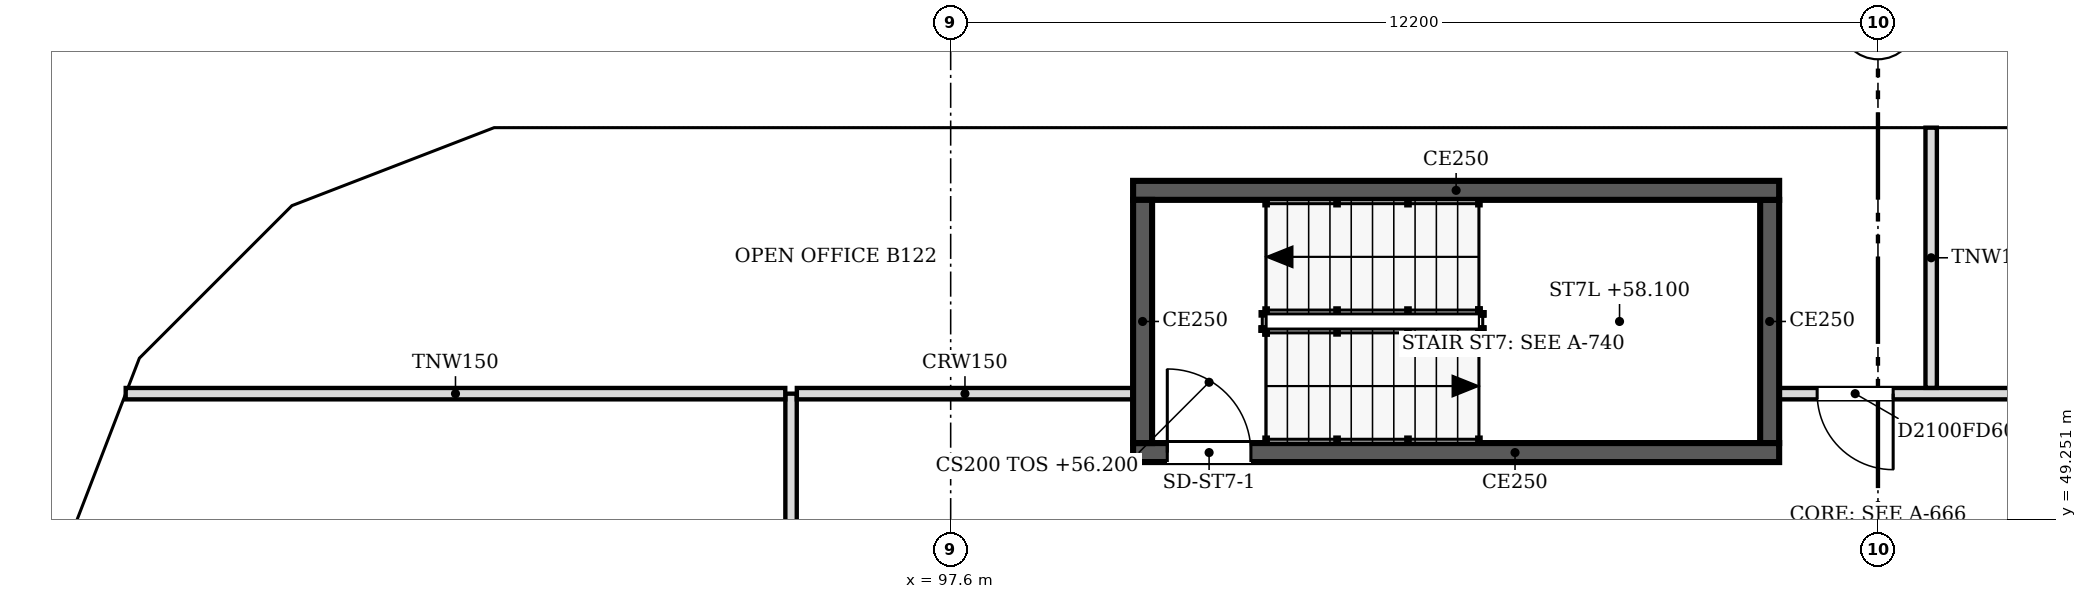
"""IFC4 building model, lengths in metres.
Left out: names, types, materials, properties, quantities, classifications, styles, units other than length and angle.
Written with IfcOpenShell. Run it as: python <this file> out.ifc"""

import sys

from ifc_helpers import new_model, si_unit, direction, frame, frame_2d, origin, place, context, subcontext, project, spatial, polyline, rectangle, outline, extrude, faceted_brep, source, transform, mapped, element, fill, save


model = new_model("IFC4")
c1 = context("Model", 3, precision=1e-05, world=origin(), true_north=direction((0.0, 1.0)))
c2 = subcontext(c1, "Body", "Model", "MODEL_VIEW")
j1 = project(units=[si_unit("LENGTHUNIT", "METRE"), si_unit("PLANEANGLEUNIT", "RADIAN")], contexts=[c1])
p1 = place(None, origin())
s1 = spatial("IfcSite", under=j1, at=p1, CompositionType="ELEMENT")
p2 = place(p1, origin())
s2 = spatial("IfcBuilding", under=s1, at=p2, CompositionType="ELEMENT")
p3 = place(p2, frame((0.0, 0.0, 56.2)))
s3 = spatial("IfcBuildingStorey", under=s2, at=p3, CompositionType="ELEMENT", Elevation=56.2)
m1 = source(origin(), c2, "Body", "SweptSolid", [
    extrude(outline(polyline([(3.05, 0.0), (6.1, 3.8), (3.05, 7.6), (0.0, 3.8), (3.05, 0.0)])), frame((0.0, 0.25, 0.0), z_axis=(0.0, -1.0, 0.0), x_axis=(1.0, 0.0, 0.0)), (0.0, 0.0, 1.0), 0.5),
])
p4 = place(p3, frame((112.85, 54.65, -3.8), z_axis=(0.0, 0.0, 1.0), x_axis=(-1.0, 0.0, 0.0)))
e1 = element("IfcWall", 1, at=p4, inside=s3, PredefinedType="SOLIDWALL", context=c2, shape_type="MappedRepresentation", body=[
    mapped(m1, transform((0.0, 0.0, 0.0), scale=1.0)),
])
m2 = source(origin(), c2, "Body", "SweptSolid", [
    extrude(outline(polyline([(3.05, 0.399), (5.78, 3.8), (3.05, 7.201), (0.321, 3.8), (3.05, 0.399)])), frame((0.0, 0.26, 0.0), z_axis=(0.0, -1.0, 0.0), x_axis=(1.0, 0.0, 0.0)), (0.0, 0.0, 1.0), 0.52),
])
p5 = place(p4, origin())
e2 = element("IfcOpeningElement", 2, at=p5, cuts=e1, PredefinedType="OPENING", context=c2, shape_type="MappedRepresentation", body=[
    mapped(m2, transform((0.0, 0.0, 0.0), scale=1.0)),
])
p6 = place(p3, frame((106.75, 54.65, -3.8), z_axis=(0.0, 0.0, 1.0), x_axis=(-1.0, 0.0, 0.0)))
e3 = element("IfcWall", 3, at=p6, inside=s3, PredefinedType="SOLIDWALL", context=c2, shape_type="MappedRepresentation", body=[
    mapped(m1, transform((0.0, 0.0, 0.0), scale=1.0)),
])
p7 = place(p6, origin())
e4 = element("IfcOpeningElement", 4, at=p7, cuts=e3, PredefinedType="OPENING", context=c2, shape_type="MappedRepresentation", body=[
    mapped(m2, transform((0.0, 0.0, 0.0), scale=1.0)),
])
m3 = source(origin(), c2, "Body", "Brep", [
    faceted_brep([(3.05, -0.25, 0.0), (6.1, -0.25, 3.8), (6.1, -0.25, 3.8), (3.05, -0.25, 7.6), (0.0, -0.25, 3.8), (0.0, 0.25, 3.8), (3.05, 0.25, 7.6), (6.1, 0.25, 3.8), (6.1, 0.25, 3.8), (3.05, 0.25, 0.0)], [[[0, 1, 2, 3, 4]], [[5, 6, 7, 8, 9]], [[9, 8, 1, 0]], [[7, 6, 3, 2]], [[6, 5, 4, 3]], [[5, 9, 0, 4]], [[1, 8, 7, 2]]]),
])
p8 = place(p3, frame((100.65, 54.65, -3.8), z_axis=(0.0, 0.0, 1.0), x_axis=(-1.0, 0.0, 0.0)))
e5 = element("IfcWall", 5, at=p8, inside=s3, PredefinedType="SOLIDWALL", context=c2, shape_type="MappedRepresentation", body=[
    mapped(m3, transform((0.0, 0.0, 0.0), scale=1.0)),
])
p9 = place(p8, origin())
e6 = element("IfcOpeningElement", 6, at=p9, cuts=e5, PredefinedType="OPENING", context=c2, shape_type="MappedRepresentation", body=[
    mapped(m2, transform((0.0, 0.0, 0.0), scale=1.0)),
])
m4 = source(origin(), c2, "Body", "Brep", [
    faceted_brep([(3.003, -0.25, 0.0), (3.05, -0.25, 0.06), (3.05, -0.25, 7.54), (3.003, -0.25, 7.6), (0.0, -0.25, 3.8), (0.0, 0.25, 3.8), (2.957, 0.25, 7.541), (2.957, 0.25, 0.059), (3.003, 0.0, 0.0), (3.003, 0.0, 7.6)], [[[0, 1, 2, 3, 4]], [[5, 6, 7]], [[1, 0, 8]], [[9, 3, 2]], [[6, 5, 4, 3, 9]], [[5, 7, 8, 0, 4]], [[1, 8, 7, 6, 9, 2]]]),
])
p10 = place(p3, frame((94.55, 54.65, -3.8), z_axis=(0.0, 0.0, 1.0), x_axis=(-1.0, 0.0, 0.0)))
e7 = element("IfcWall", 7, at=p10, inside=s3, PredefinedType="SOLIDWALL", context=c2, shape_type="MappedRepresentation", body=[
    mapped(m4, transform((0.0, 0.0, 0.0), scale=1.0)),
])
m5 = source(origin(), c2, "Body", "SweptSolid", [
    extrude(outline(polyline([(2.803, 6.944), (0.319, 3.8), (2.803, 0.656), (2.803, 6.944)])), frame((0.0, 0.26, 0.0), z_axis=(0.0, -1.0, 0.0), x_axis=(1.0, 0.0, 0.0)), (0.0, 0.0, 1.0), 0.52),
])
p11 = place(p10, origin())
e8 = element("IfcOpeningElement", 8, at=p11, cuts=e7, PredefinedType="OPENING", context=c2, shape_type="MappedRepresentation", body=[
    mapped(m5, transform((0.0, 0.0, 0.0), scale=1.0)),
])
m6 = source(origin(), c2, "Body", "Brep", [
    faceted_brep([(0.047, -0.25, 0.0), (2.997, -0.25, 3.8), (0.047, -0.25, 7.6), (0.0, -0.25, 7.541), (0.0, -0.25, 0.059), (0.093, 0.25, 7.54), (2.944, 0.25, 3.868), (2.944, 0.25, 3.732), (0.093, 0.25, 0.06), (2.997, 0.0, 3.8), (0.047, 0.0, 0.0), (0.047, 0.0, 7.6)], [[[0, 1, 2, 3, 4]], [[5, 6, 7, 8]], [[8, 7, 9, 1, 0, 10]], [[6, 5, 11, 2, 1, 9]], [[3, 2, 11]], [[10, 0, 4]], [[8, 10, 4, 3, 11, 5]], [[9, 7, 6]]]),
])
p12 = place(p3, frame((91.59, 54.667, -3.8), z_axis=(0.0, 0.0, 1.0), x_axis=(-0.933000876937, -0.359874094142, 0.0)))
e9 = element("IfcWall", 9, at=p12, inside=s3, PredefinedType="SOLIDWALL", context=c2, shape_type="MappedRepresentation", body=[
    mapped(m6, transform((0.0, 0.0, 0.0), scale=1.0)),
])
m7 = source(origin(), c2, "Body", "SweptSolid", [
    extrude(outline(polyline([(0.247, 0.665), (2.681, 3.8), (0.247, 6.935), (0.247, 0.665)])), frame((0.0, 0.26, 0.0), z_axis=(0.0, -1.0, 0.0), x_axis=(1.0, 0.0, 0.0)), (0.0, 0.0, 1.0), 0.52),
])
p13 = place(p12, origin())
e10 = element("IfcOpeningElement", 10, at=p13, cuts=e9, PredefinedType="OPENING", context=c2, shape_type="MappedRepresentation", body=[
    mapped(m7, transform((0.0, 0.0, 0.0), scale=1.0)),
])
m8 = source(origin(), c2, "Body", "Brep", [
    faceted_brep([(2.944, -0.25, 0.0), (2.997, -0.25, 0.068), (2.997, -0.25, 7.532), (2.944, -0.25, 7.6), (0.0, -0.25, 3.8), (0.053, 0.25, 3.868), (2.891, 0.25, 7.532), (2.891, 0.25, 0.068), (0.053, 0.25, 3.732), (2.944, 0.0, 0.0), (2.944, 0.0, 7.6), (0.0, 0.0, 3.8)], [[[0, 1, 2, 3, 4]], [[5, 6, 7, 8]], [[1, 0, 9]], [[10, 3, 2]], [[6, 5, 11, 4, 3, 10]], [[8, 7, 9, 0, 4, 11]], [[8, 11, 5]], [[1, 9, 7, 6, 10, 2]]]),
])
p14 = place(p3, frame((88.794, 53.588, -3.8), z_axis=(0.0, 0.0, 1.0), x_axis=(-0.707066050402, -0.707147509625, 0.0)))
e11 = element("IfcWall", 11, at=p14, inside=s3, PredefinedType="SOLIDWALL", context=c2, shape_type="MappedRepresentation", body=[
    mapped(m8, transform((0.0, 0.0, 0.0), scale=1.0)),
])
m9 = source(origin(), c2, "Body", "SweptSolid", [
    extrude(outline(polyline([(2.744, 6.934), (0.316, 3.8), (2.744, 0.667), (2.744, 6.934)])), frame((0.0, 0.26, 0.0), z_axis=(0.0, -1.0, 0.0), x_axis=(1.0, 0.0, 0.0)), (0.0, 0.0, 1.0), 0.52),
])
p15 = place(p14, origin())
e12 = element("IfcOpeningElement", 12, at=p15, cuts=e11, PredefinedType="OPENING", context=c2, shape_type="MappedRepresentation", body=[
    mapped(m9, transform((0.0, 0.0, 0.0), scale=1.0)),
])
m10 = source(origin(), c2, "Body", "Brep", [
    faceted_brep([(0.053, -0.25, 0.0), (3.003, -0.25, 3.8), (0.053, -0.25, 7.6), (0.0, -0.25, 7.532), (0.0, -0.25, 0.068), (0.106, 0.25, 7.532), (2.957, 0.25, 3.86), (2.957, 0.25, 3.74), (0.106, 0.25, 0.068), (3.003, 0.0, 3.8), (0.053, 0.0, 0.0), (0.053, 0.0, 7.6)], [[[0, 1, 2, 3, 4]], [[5, 6, 7, 8]], [[8, 7, 9, 1, 0, 10]], [[6, 5, 11, 2, 1, 9]], [[3, 2, 11]], [[10, 0, 4]], [[8, 10, 4, 3, 11, 5]], [[9, 7, 6]]]),
])
p16 = place(p3, frame((86.731, 51.556, -3.8), z_axis=(0.0, 0.0, 1.0), x_axis=(-0.359855894603, -0.933007896601, 0.0)))
e13 = element("IfcWall", 13, at=p16, inside=s3, PredefinedType="SOLIDWALL", context=c2, shape_type="MappedRepresentation", body=[
    mapped(m10, transform((0.0, 0.0, 0.0), scale=1.0)),
])
m11 = source(origin(), c2, "Body", "SweptSolid", [
    extrude(outline(polyline([(0.253, 0.665), (2.687, 3.8), (0.253, 6.935), (0.253, 0.665)])), frame((0.0, 0.26, 0.0), z_axis=(0.0, -1.0, 0.0), x_axis=(1.0, 0.0, 0.0)), (0.0, 0.0, 1.0), 0.52),
])
p17 = place(p16, origin())
e14 = element("IfcOpeningElement", 14, at=p17, cuts=e13, PredefinedType="OPENING", context=c2, shape_type="MappedRepresentation", body=[
    mapped(m11, transform((0.0, 0.0, 0.0), scale=1.0)),
])
p18 = place(p2, frame((0.0, 0.0, 60.0)))
s4 = spatial("IfcBuildingStorey", under=s2, at=p18, CompositionType="ELEMENT", Elevation=60.0)
p19 = place(p18, frame((115.9, 54.65, -3.8), z_axis=(0.0, 0.0, 1.0), x_axis=(-1.0, 0.0, 0.0)))
e15 = element("IfcWall", 15, at=p19, inside=s4, PredefinedType="SOLIDWALL", context=c2, shape_type="MappedRepresentation", body=[
    mapped(m3, transform((0.0, 0.0, 0.0), scale=1.0)),
])
p20 = place(p19, origin())
e16 = element("IfcOpeningElement", 16, at=p20, cuts=e15, PredefinedType="OPENING", context=c2, shape_type="MappedRepresentation", body=[
    mapped(m2, transform((0.0, 0.0, 0.0), scale=1.0)),
])
p21 = place(p18, frame((109.8, 54.65, -3.8), z_axis=(0.0, 0.0, 1.0), x_axis=(-1.0, 0.0, 0.0)))
e17 = element("IfcWall", 17, at=p21, inside=s4, PredefinedType="SOLIDWALL", context=c2, shape_type="MappedRepresentation", body=[
    mapped(m1, transform((0.0, 0.0, 0.0), scale=1.0)),
])
p22 = place(p21, origin())
e18 = element("IfcOpeningElement", 18, at=p22, cuts=e17, PredefinedType="OPENING", context=c2, shape_type="MappedRepresentation", body=[
    mapped(m2, transform((0.0, 0.0, 0.0), scale=1.0)),
])
p23 = place(p18, frame((103.7, 54.65, -3.8), z_axis=(0.0, 0.0, 1.0), x_axis=(-1.0, 0.0, 0.0)))
e19 = element("IfcWall", 19, at=p23, inside=s4, PredefinedType="SOLIDWALL", context=c2, shape_type="MappedRepresentation", body=[
    mapped(m3, transform((0.0, 0.0, 0.0), scale=1.0)),
])
p24 = place(p23, origin())
e20 = element("IfcOpeningElement", 20, at=p24, cuts=e19, PredefinedType="OPENING", context=c2, shape_type="MappedRepresentation", body=[
    mapped(m2, transform((0.0, 0.0, 0.0), scale=1.0)),
])
m12 = source(origin(), c2, "Body", "Brep", [
    faceted_brep([(3.05, -0.25, 0.0), (6.053, -0.25, 3.8), (3.05, -0.25, 7.6), (0.0, -0.25, 3.8), (0.0, 0.25, 3.8), (3.05, 0.25, 7.6), (6.007, 0.25, 3.859), (6.007, 0.25, 3.741), (3.05, 0.25, 0.0), (6.053, 0.0, 3.8)], [[[0, 1, 2, 3]], [[4, 5, 6, 7, 8]], [[8, 7, 9, 1, 0]], [[6, 5, 2, 1, 9]], [[5, 4, 3, 2]], [[4, 8, 0, 3]], [[9, 7, 6]]]),
])
p25 = place(p18, frame((97.6, 54.65, -3.8), z_axis=(0.0, 0.0, 1.0), x_axis=(-1.0, 0.0, 0.0)))
e21 = element("IfcWall", 21, at=p25, inside=s4, PredefinedType="SOLIDWALL", context=c2, shape_type="MappedRepresentation", body=[
    mapped(m12, transform((0.0, 0.0, 0.0), scale=1.0)),
])
m13 = source(origin(), c2, "Body", "SweptSolid", [
    extrude(outline(polyline([(3.049, 0.401), (5.735, 3.8), (3.049, 7.199), (0.321, 3.8), (3.049, 0.401)])), frame((0.0, 0.26, 0.0), z_axis=(0.0, -1.0, 0.0), x_axis=(1.0, 0.0, 0.0)), (0.0, 0.0, 1.0), 0.52),
])
p26 = place(p25, origin())
e22 = element("IfcOpeningElement", 22, at=p26, cuts=e21, PredefinedType="OPENING", context=c2, shape_type="MappedRepresentation", body=[
    mapped(m13, transform((0.0, 0.0, 0.0), scale=1.0)),
])
m14 = source(origin(), c2, "Body", "Brep", [
    faceted_brep([(2.95, -0.25, 0.0), (3.003, -0.25, 0.068), (3.003, -0.25, 7.532), (2.95, -0.25, 7.6), (0.0, -0.25, 3.8), (0.047, 0.25, 3.86), (2.898, 0.25, 7.532), (2.898, 0.25, 0.068), (0.047, 0.25, 3.74), (2.95, 0.0, 0.0), (2.95, 0.0, 7.6), (0.0, 0.0, 3.8)], [[[0, 1, 2, 3, 4]], [[5, 6, 7, 8]], [[1, 0, 9]], [[10, 3, 2]], [[6, 5, 11, 4, 3, 10]], [[8, 7, 9, 0, 4, 11]], [[8, 11, 5]], [[1, 9, 7, 6, 10, 2]]]),
])
p27 = place(p18, frame((91.547, 54.65, -3.8), z_axis=(0.0, 0.0, 1.0), x_axis=(-0.933007896601, -0.359855894603, 0.0)))
e23 = element("IfcWall", 23, at=p27, inside=s4, PredefinedType="SOLIDWALL", context=c2, shape_type="MappedRepresentation", body=[
    mapped(m14, transform((0.0, 0.0, 0.0), scale=1.0)),
])
m15 = source(origin(), c2, "Body", "SweptSolid", [
    extrude(outline(polyline([(2.75, 6.935), (0.316, 3.8), (2.75, 0.665), (2.75, 6.935)])), frame((0.0, 0.26, 0.0), z_axis=(0.0, -1.0, 0.0), x_axis=(1.0, 0.0, 0.0)), (0.0, 0.0, 1.0), 0.52),
])
p28 = place(p27, origin())
e24 = element("IfcOpeningElement", 24, at=p28, cuts=e23, PredefinedType="OPENING", context=c2, shape_type="MappedRepresentation", body=[
    mapped(m15, transform((0.0, 0.0, 0.0), scale=1.0)),
])
m16 = source(origin(), c2, "Body", "Brep", [
    faceted_brep([(0.053, -0.25, 0.0), (2.997, -0.25, 3.8), (0.053, -0.25, 7.6), (0.0, -0.25, 7.532), (0.0, -0.25, 0.068), (0.106, 0.25, 7.532), (2.944, 0.25, 3.868), (2.944, 0.25, 3.732), (0.106, 0.25, 0.068), (2.997, 0.0, 3.8), (0.053, 0.0, 0.0), (0.053, 0.0, 7.6)], [[[0, 1, 2, 3, 4]], [[5, 6, 7, 8]], [[8, 7, 9, 1, 0, 10]], [[6, 5, 11, 2, 1, 9]], [[3, 2, 11]], [[10, 0, 4]], [[8, 10, 4, 3, 11, 5]], [[9, 7, 6]]]),
])
p29 = place(p18, frame((88.831, 53.625, -3.8), z_axis=(0.0, 0.0, 1.0), x_axis=(-0.707147509625, -0.707066050402, 0.0)))
e25 = element("IfcWall", 25, at=p29, inside=s4, PredefinedType="SOLIDWALL", context=c2, shape_type="MappedRepresentation", body=[
    mapped(m16, transform((0.0, 0.0, 0.0), scale=1.0)),
])
m17 = source(origin(), c2, "Body", "SweptSolid", [
    extrude(outline(polyline([(0.253, 0.666), (2.681, 3.8), (0.253, 6.934), (0.253, 0.666)])), frame((0.0, 0.26, 0.0), z_axis=(0.0, -1.0, 0.0), x_axis=(1.0, 0.0, 0.0)), (0.0, 0.0, 1.0), 0.52),
])
p30 = place(p29, origin())
e26 = element("IfcOpeningElement", 26, at=p30, cuts=e25, PredefinedType="OPENING", context=c2, shape_type="MappedRepresentation", body=[
    mapped(m17, transform((0.0, 0.0, 0.0), scale=1.0)),
])
m18 = source(origin(), c2, "Body", "Brep", [
    faceted_brep([(2.95, -0.25, 0.0), (2.997, -0.25, 0.059), (2.997, -0.25, 7.541), (2.95, -0.25, 7.6), (0.0, -0.25, 3.8), (0.053, 0.25, 3.868), (2.904, 0.25, 7.54), (2.904, 0.25, 0.06), (0.053, 0.25, 3.732), (2.95, 0.0, 0.0), (2.95, 0.0, 7.6), (0.0, 0.0, 3.8)], [[[0, 1, 2, 3, 4]], [[5, 6, 7, 8]], [[1, 0, 9]], [[10, 3, 2]], [[6, 5, 11, 4, 3, 10]], [[8, 7, 9, 0, 4, 11]], [[8, 11, 5]], [[1, 9, 7, 6, 10, 2]]]),
])
p31 = place(p18, frame((86.712, 51.506, -3.8), z_axis=(0.0, 0.0, 1.0), x_axis=(-0.359874094142, -0.933000876937, 0.0)))
e27 = element("IfcWall", 27, at=p31, inside=s4, PredefinedType="SOLIDWALL", context=c2, shape_type="MappedRepresentation", body=[
    mapped(m18, transform((0.0, 0.0, 0.0), scale=1.0)),
])
p32 = place(p31, origin())
e28 = element("IfcOpeningElement", 28, at=p32, cuts=e27, PredefinedType="OPENING", context=c2, shape_type="MappedRepresentation", body=[
    mapped(m15, transform((0.0, 0.0, 0.0), scale=1.0)),
])
p33 = place(p3, frame((108.5, 50.125, 0.0), z_axis=(0.0, 0.0, 1.0), x_axis=(-1.0, 0.0, 0.0)))
e29 = element("IfcWall", 29, at=p33, inside=s3, PredefinedType="SOLIDWALL", context=c2, shape_type="SweptSolid", body=[
    extrude(rectangle(XDim=8.5, YDim=0.25, at=frame_2d((4.25, 0.0))), origin(), (0.0, 0.0, 1.0), 3.8),
])
m19 = source(origin(), c2, "Body", "SweptSolid", [
    extrude(rectangle(XDim=1.1, YDim=2.1, at=frame_2d((0.55, 1.05))), frame((0.0, 0.135, 0.0), z_axis=(0.0, -1.0, 0.0), x_axis=(1.0, 0.0, 0.0)), (0.0, 0.0, 1.0), 0.27),
])
p34 = place(p33, frame((6.95, 0.0, 0.0)))
e30 = element("IfcOpeningElement", 30, at=p34, cuts=e29, PredefinedType="OPENING", context=c2, shape_type="MappedRepresentation", body=[
    mapped(m19, transform((0.0, 0.0, 0.0), scale=1.0)),
])
p35 = place(p3, frame((100.125, 50.25, 0.0), z_axis=(0.0, 0.0, 1.0), x_axis=(0.0, 1.0, 0.0)))
e31 = element("IfcWall", 31, at=p35, inside=s3, PredefinedType="SOLIDWALL", context=c2, shape_type="SweptSolid", body=[
    extrude(rectangle(XDim=3.2, YDim=0.25, at=frame_2d((1.6, 0.0))), origin(), (0.0, 0.0, 1.0), 3.8),
])
p36 = place(p3, frame((100.0, 53.575, 0.0), z_axis=(0.0, 0.0, 1.0), x_axis=(1.0, 0.0, 0.0)))
e32 = element("IfcWall", 32, at=p36, inside=s3, PredefinedType="SOLIDWALL", context=c2, shape_type="SweptSolid", body=[
    extrude(rectangle(XDim=8.5, YDim=0.25, at=frame_2d((4.25, 0.0))), origin(), (0.0, 0.0, 1.0), 3.8),
])
p37 = place(p3, frame((108.375, 53.45, 0.0), z_axis=(0.0, 0.0, 1.0), x_axis=(0.0, -1.0, 0.0)))
e33 = element("IfcWall", 33, at=p37, inside=s3, PredefinedType="SOLIDWALL", context=c2, shape_type="SweptSolid", body=[
    extrude(rectangle(XDim=3.2, YDim=0.25, at=frame_2d((1.6, 0.0))), origin(), (0.0, 0.0, 1.0), 3.8),
])
p38 = place(p3, frame((95.5, 36.676, 0.0), z_axis=(0.0, 0.0, 1.0), x_axis=(0.0, 1.0, 0.0)))
e34 = element("IfcWall", 34, at=p38, inside=s3, PredefinedType="PARTITIONING", context=c2, shape_type="SweptSolid", body=[
    extrude(rectangle(XDim=14.224, YDim=0.15, at=frame_2d((7.112, 0.0))), origin(), (0.0, 0.0, 1.0), 3.067),
])
m20 = source(origin(), c2, "Body", "SweptSolid", [
    extrude(rectangle(XDim=1.0, YDim=2.1, at=frame_2d((0.5, 1.05))), frame((0.0, 0.085, 0.0), z_axis=(0.0, -1.0, 0.0), x_axis=(1.0, 0.0, 0.0)), (0.0, 0.0, 1.0), 0.17),
])
p39 = place(p38, frame((11.025, 0.0, 0.0)))
e35 = element("IfcOpeningElement", 35, at=p39, cuts=e34, PredefinedType="OPENING", context=c2, shape_type="MappedRepresentation", body=[
    mapped(m20, transform((0.0, 0.0, 0.0), scale=1.0)),
])
p40 = place(p3, frame((86.746, 50.9, 0.0), z_axis=(0.0, 0.0, 1.0), x_axis=(1.0, 0.0, 0.0)))
e36 = element("IfcWall", 36, at=p40, inside=s3, PredefinedType="PARTITIONING", context=c2, shape_type="SweptSolid", body=[
    extrude(rectangle(XDim=8.678, YDim=0.15, at=frame_2d((4.339, 0.0))), origin(), (0.0, 0.0, 1.0), 3.067),
])
p41 = place(p3, frame((95.576, 50.9, 0.0), z_axis=(0.0, 0.0, 1.0), x_axis=(1.0, 0.0, 0.0)))
e37 = element("IfcWall", 37, at=p41, inside=s3, PredefinedType="PARTITIONING", context=c2, shape_type="SweptSolid", body=[
    extrude(rectangle(XDim=4.424, YDim=0.15, at=frame_2d((2.212, 0.0))), origin(), (0.0, 0.0, 1.0), 3.067),
])
p42 = place(p3, frame((108.5, 50.9, 0.0), z_axis=(0.0, 0.0, 1.0), x_axis=(1.0, 0.0, 0.0)))
e38 = element("IfcWall", 38, at=p42, inside=s3, PredefinedType="PARTITIONING", context=c2, shape_type="SweptSolid", body=[
    extrude(rectangle(XDim=15.6, YDim=0.15, at=frame_2d((7.8, 0.0))), origin(), (0.0, 0.0, 1.0), 3.067),
])
p43 = place(p42, frame((0.5, 0.0, 0.0)))
e39 = element("IfcOpeningElement", 39, at=p43, cuts=e38, PredefinedType="OPENING", context=c2, shape_type="MappedRepresentation", body=[
    mapped(m20, transform((0.0, 0.0, 0.0), scale=1.0)),
])
m21 = source(origin(), c2, "Body", "SweptSolid", [
    extrude(rectangle(XDim=0.9, YDim=2.1, at=frame_2d((0.45, 1.05))), frame((0.0, 0.085, 0.0), z_axis=(0.0, -1.0, 0.0), x_axis=(1.0, 0.0, 0.0)), (0.0, 0.0, 1.0), 0.17),
])
p44 = place(p42, frame((8.3, 0.0, 0.0)))
e40 = element("IfcOpeningElement", 40, at=p44, cuts=e38, PredefinedType="OPENING", context=c2, shape_type="MappedRepresentation", body=[
    mapped(m21, transform((0.0, 0.0, 0.0), scale=1.0)),
])
p45 = place(p3, frame((110.5, 50.976, 0.0), z_axis=(0.0, 0.0, 1.0), x_axis=(0.0, 1.0, 0.0)))
e41 = element("IfcWall", 41, at=p45, inside=s3, PredefinedType="PARTITIONING", context=c2, shape_type="SweptSolid", body=[
    extrude(rectangle(XDim=3.424, YDim=0.15, at=frame_2d((1.712, 0.0))), origin(), (0.0, 0.0, 1.0), 3.067),
])
m22 = source(origin(), c2, "Body", "SweptSolid", [
    extrude(rectangle(XDim=1.1, YDim=2.1, at=frame_2d((0.55, 1.05))), frame((0.0, 0.025, 0.0), z_axis=(0.0, -1.0, 0.0), x_axis=(1.0, 0.0, 0.0)), (0.0, 0.0, 1.0), 0.05),
])
p46 = place(p34, origin())
e42 = element("IfcDoor", 42, at=p46, inside=s3, OperationType="SINGLE_SWING_RIGHT", PredefinedType="DOOR", context=c2, shape_type="MappedRepresentation", body=[
    mapped(m22, transform((0.0, 0.0, 0.0), scale=1.0)),
])
fill(e30, e42)
m23 = source(origin(), c2, "Body", "SweptSolid", [
    extrude(rectangle(XDim=1.0, YDim=2.1, at=frame_2d((0.5, 1.05))), frame((0.0, 0.025, 0.0), z_axis=(0.0, -1.0, 0.0), x_axis=(1.0, 0.0, 0.0)), (0.0, 0.0, 1.0), 0.05),
])
p47 = place(p43, origin())
e43 = element("IfcDoor", 43, at=p47, inside=s3, OperationType="SINGLE_SWING_RIGHT", PredefinedType="DOOR", context=c2, shape_type="MappedRepresentation", body=[
    mapped(m23, transform((0.0, 0.0, 0.0), scale=1.0)),
])
fill(e39, e43)
save(model, sys.argv[1])
